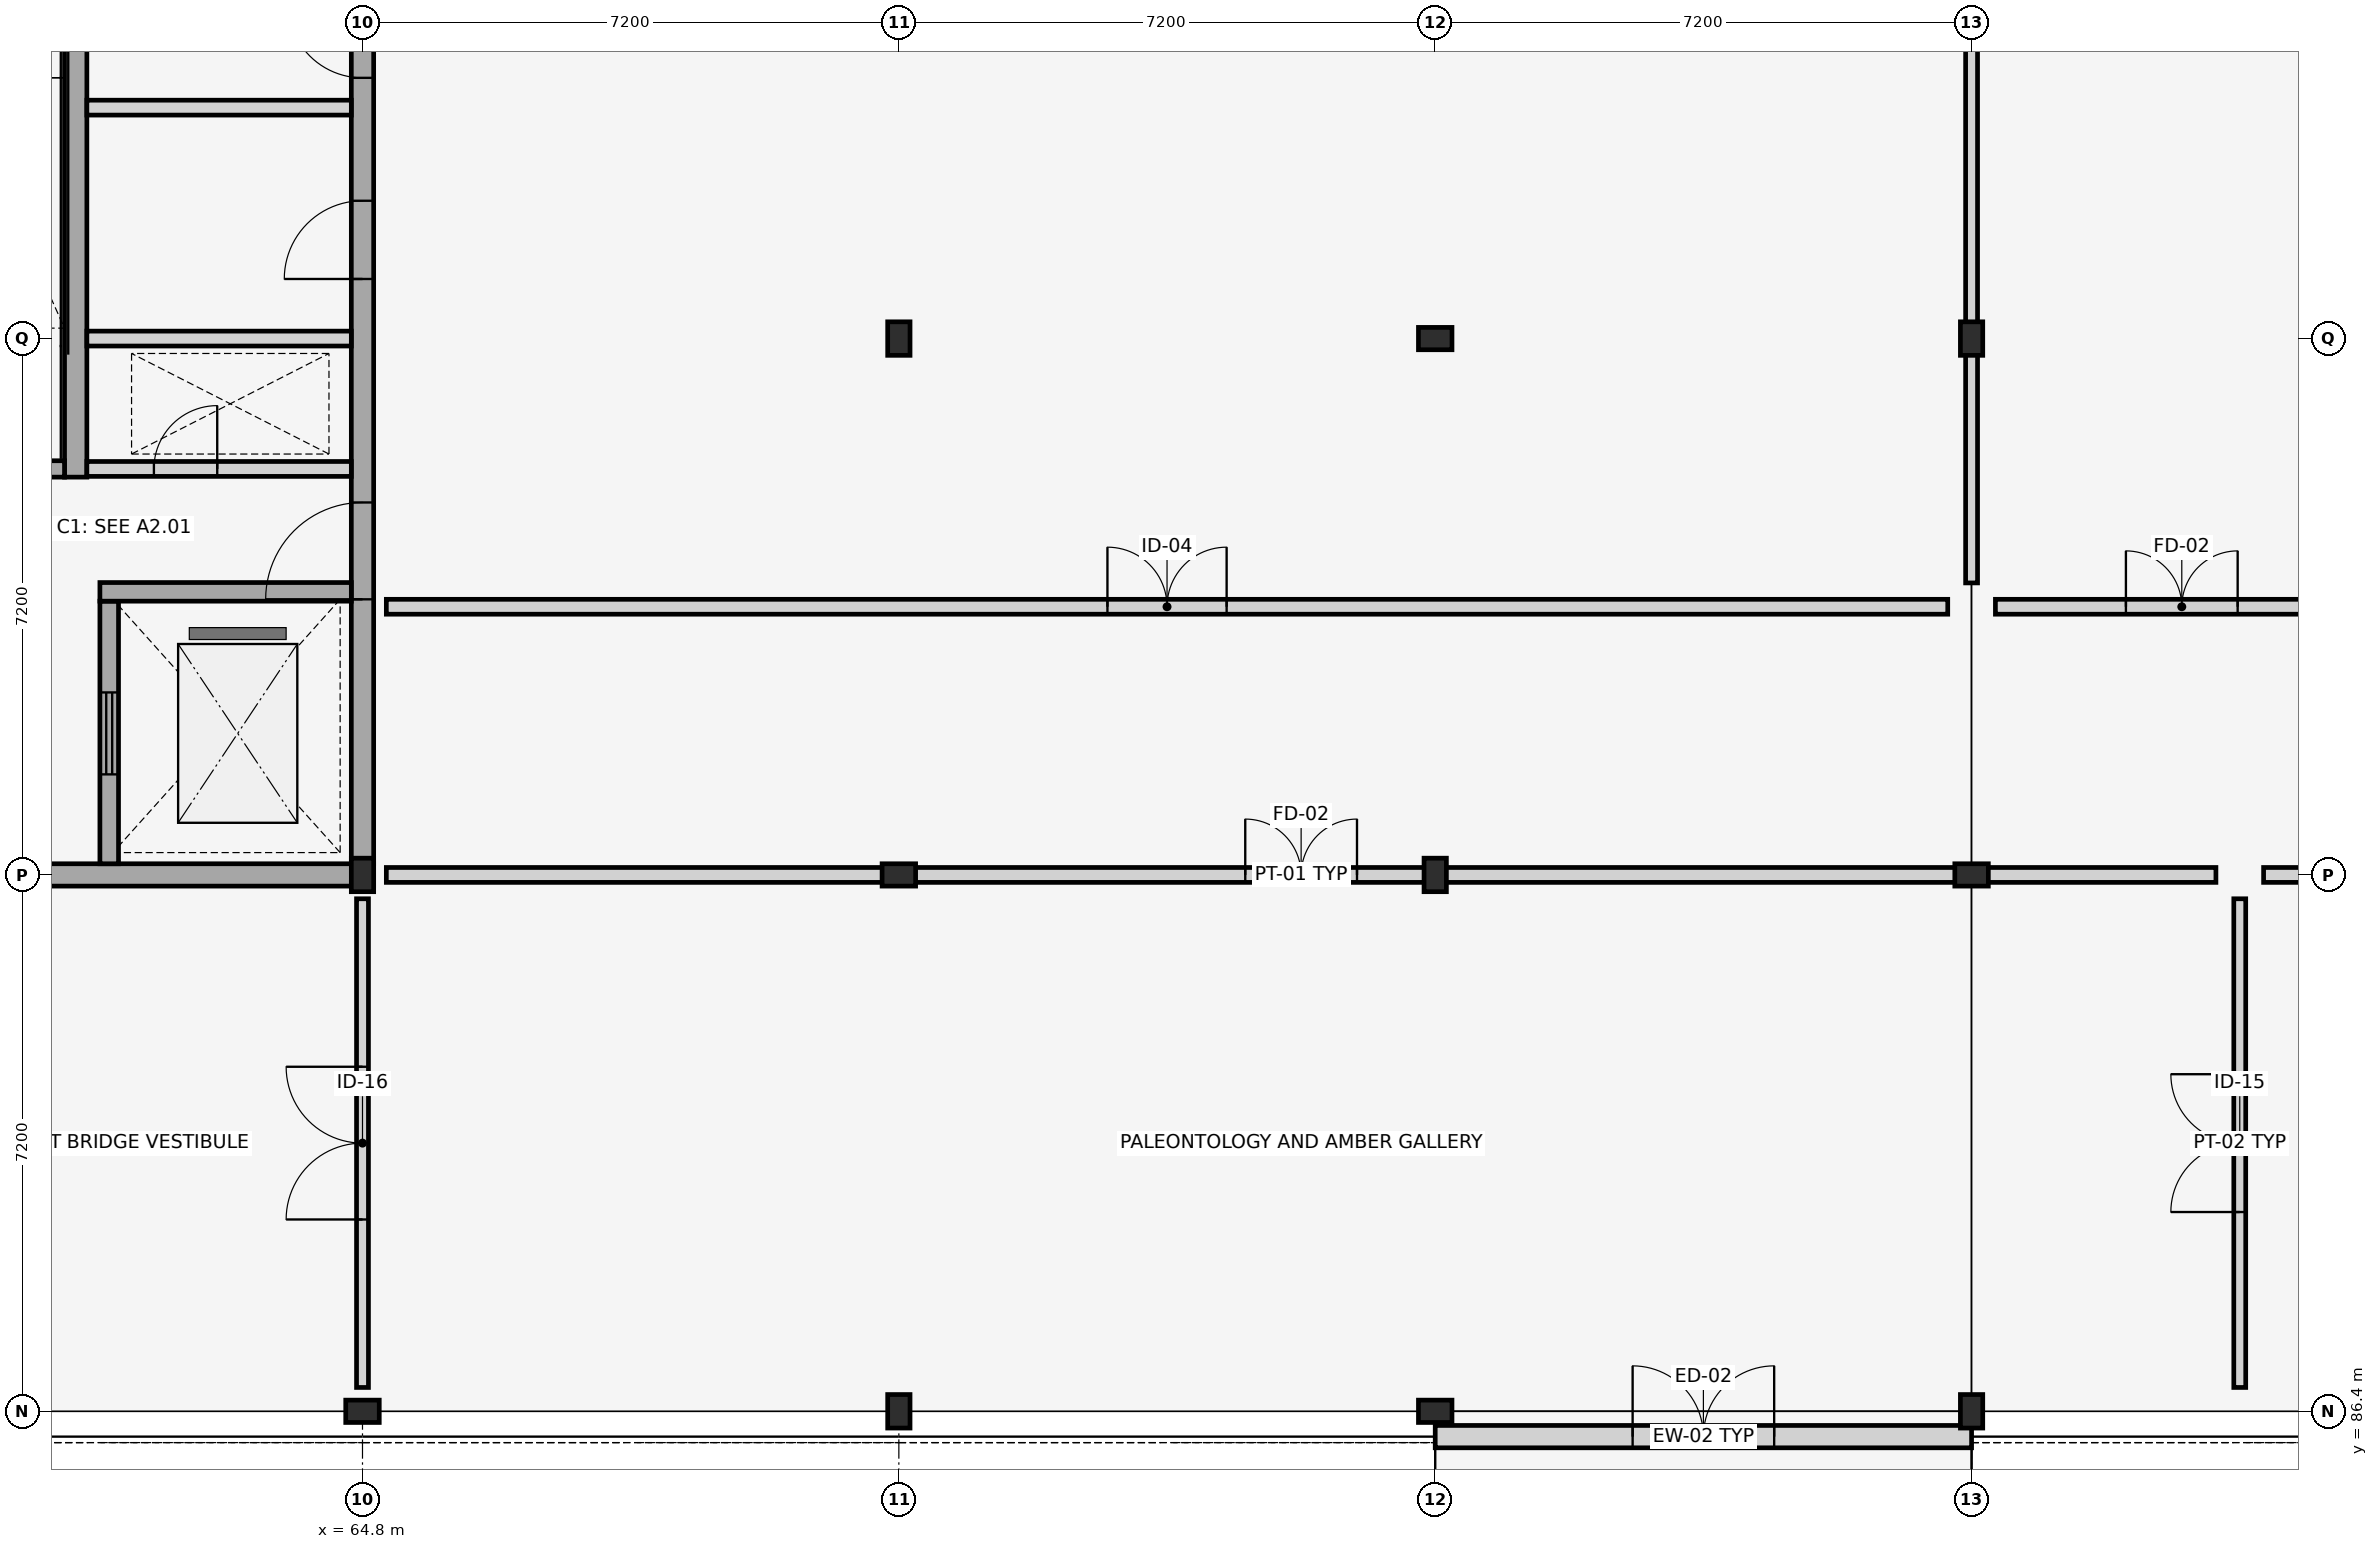
"""IFC4 building model, lengths in metres.
Left out: names, types, materials, properties, quantities, classifications, styles, units other than length and angle.
Written with IfcOpenShell. Run it as: python <this file> out.ifc"""

import sys

from ifc_helpers import new_model, si_unit, direction, frame, frame_2d, origin, origin_2d, place, context, subcontext, project, spatial, rectangle, i_section, extrude, element, fill, save


model = new_model("IFC4")
c1 = context("Model", 3, precision=1e-05, world=origin(), true_north=direction((0.0, 1.0)))
c2 = subcontext(c1, "Body", "Model", "MODEL_VIEW")
j1 = project(units=[si_unit("LENGTHUNIT", "METRE"), si_unit("PLANEANGLEUNIT", "RADIAN")], contexts=[c1])
p1 = place(None, origin())
s1 = spatial("IfcSite", under=j1, at=p1, CompositionType="ELEMENT")
p2 = place(p1, origin())
s2 = spatial("IfcBuilding", under=s1, at=p2, CompositionType="ELEMENT")
p3 = place(p2, frame((0.0, 0.0, 4.5)))
s3 = spatial("IfcBuildingStorey", under=s2, at=p3, CompositionType="ELEMENT", Elevation=4.5)
for number, where, z_axis, x_axis in (
    (1, (64.8, 86.4, 0.0), (0.0, 0.0, 1.0), (0.0, 1.0, 0.0)),
    (2, (64.8, 93.6, 0.0), (0.0, 0.0, 1.0), (1.0, 0.0, 0.0)),
    (3, (72.0, 86.4, 0.0), (0.0, 0.0, 1.0), (1.0, 0.0, 0.0)),
    (4, (72.0, 93.6, 0.0), (0.0, 0.0, 1.0), (0.0, 1.0, 0.0)),
    (5, (72.0, 100.8, 0.0), (0.0, 0.0, 1.0), (1.0, 0.0, 0.0)),
    (6, (79.2, 86.4, 0.0), (0.0, 0.0, 1.0), (0.0, 1.0, 0.0)),
    (7, (79.2, 93.6, 0.0), (0.0, 0.0, 1.0), (1.0, 0.0, 0.0)),
    (8, (79.2, 100.8, 0.0), (0.0, 0.0, 1.0), (0.0, 1.0, 0.0)),
    (9, (86.4, 86.4, 0.0), (0.0, 0.0, 1.0), (1.0, 0.0, 0.0)),
    (10, (86.4, 93.6, 0.0), (0.0, 0.0, 1.0), (0.0, 1.0, 0.0)),
    (11, (86.4, 100.8, 0.0), (0.0, 0.0, 1.0), (1.0, 0.0, 0.0)),
):
    element("IfcColumn", number, at=place(p3, frame(where, z_axis=z_axis, x_axis=x_axis)), inside=s3, PredefinedType="COLUMN", context=c2, shape_type="SweptSolid", body=[
        extrude(i_section(OverallWidth=0.3, OverallDepth=0.45, WebThickness=0.014, FlangeThickness=0.026, FilletRadius=0.027, at=origin_2d()), origin(), (0.0, 0.0, 1.0), 4.2),
    ])
p4 = place(p3, frame((79.2, 86.06, 0.0), z_axis=(0.0, 0.0, 1.0), x_axis=(1.0, 0.0, 0.0)))
e12 = element("IfcWall", 12, at=p4, inside=s3, PredefinedType="STANDARD", context=c2, shape_type="SweptSolid", body=[
    extrude(rectangle(XDim=7.2, YDim=0.3, at=frame_2d((3.6, 0.0))), origin(), (0.0, 0.0, 1.0), 3.65),
])
p5 = place(p4, frame((2.65, 0.0, 0.0)))
e13 = element("IfcOpeningElement", 13, at=p5, cuts=e12, PredefinedType="OPENING", context=c2, shape_type="SweptSolid", body=[
    extrude(rectangle(XDim=1.9, YDim=2.45, at=frame_2d((0.95, 1.225))), frame((0.0, 0.16, 0.0), z_axis=(0.0, -1.0, 0.0), x_axis=(1.0, 0.0, 0.0)), (0.0, 0.0, 1.0), 0.32),
])
p6 = place(p3, frame((57.6, 93.6, 0.0), z_axis=(0.0, 0.0, 1.0), x_axis=(1.0, 0.0, 0.0)))
e14 = element("IfcWall", 14, at=p6, inside=s3, PredefinedType="SHEAR", context=c2, shape_type="SweptSolid", body=[
    extrude(rectangle(XDim=7.35, YDim=0.3, at=frame_2d((3.675, 0.0))), origin(), (0.0, 0.0, 1.0), 3.98),
])
p7 = place(p3, frame((64.8, 93.75, 0.0), z_axis=(0.0, 0.0, 1.0), x_axis=(0.0, 1.0, 0.0)))
e15 = element("IfcWall", 15, at=p7, inside=s3, PredefinedType="SHEAR", context=c2, shape_type="SweptSolid", body=[
    extrude(rectangle(XDim=14.1, YDim=0.3, at=frame_2d((7.05, 0.0))), origin(), (0.0, 0.0, 1.0), 3.98),
])
p8 = place(p7, frame((3.55, 0.0, 0.0)))
e16 = element("IfcOpeningElement", 16, at=p8, cuts=e15, PredefinedType="OPENING", context=c2, shape_type="SweptSolid", body=[
    extrude(rectangle(XDim=1.3, YDim=2.2, at=frame_2d((0.65, 1.1))), frame((0.0, 0.16, 0.0), z_axis=(0.0, -1.0, 0.0), x_axis=(1.0, 0.0, 0.0)), (0.0, 0.0, 1.0), 0.32),
])
p9 = place(p7, frame((7.85, 0.0, 0.0)))
e17 = element("IfcOpeningElement", 17, at=p9, cuts=e15, PredefinedType="OPENING", context=c2, shape_type="SweptSolid", body=[
    extrude(rectangle(XDim=1.05, YDim=2.15, at=frame_2d((0.525, 1.075))), frame((0.0, 0.16, 0.0), z_axis=(0.0, -1.0, 0.0), x_axis=(1.0, 0.0, 0.0)), (0.0, 0.0, 1.0), 0.32),
])
p10 = place(p7, frame((10.55, 0.0, 0.0)))
e18 = element("IfcOpeningElement", 18, at=p10, cuts=e15, PredefinedType="OPENING", context=c2, shape_type="SweptSolid", body=[
    extrude(rectangle(XDim=1.0, YDim=2.15, at=frame_2d((0.5, 1.075))), frame((0.0, 0.16, 0.0), z_axis=(0.0, -1.0, 0.0), x_axis=(1.0, 0.0, 0.0)), (0.0, 0.0, 1.0), 0.32),
])
p11 = place(p3, frame((61.4, 93.75, 0.0), z_axis=(0.0, 0.0, 1.0), x_axis=(0.0, 1.0, 0.0)))
e19 = element("IfcWall", 19, at=p11, inside=s3, PredefinedType="SHEAR", context=c2, shape_type="SweptSolid", body=[
    extrude(rectangle(XDim=3.525, YDim=0.25, at=frame_2d((1.762, 0.0))), origin(), (0.0, 0.0, 1.0), 3.98),
])
p12 = place(p11, frame((1.2, 0.0, 0.0)))
e20 = element("IfcOpeningElement", 20, at=p12, cuts=e19, PredefinedType="OPENING", context=c2, shape_type="SweptSolid", body=[
    extrude(rectangle(XDim=1.1, YDim=2.15, at=frame_2d((0.55, 1.075))), frame((0.0, 0.135, 0.0), z_axis=(0.0, -1.0, 0.0), x_axis=(1.0, 0.0, 0.0)), (0.0, 0.0, 1.0), 0.27),
])
p13 = place(p3, frame((60.95, 98.94, 0.0), z_axis=(0.0, 0.0, 1.0), x_axis=(0.0, 1.0, 0.0)))
e21 = element("IfcWall", 21, at=p13, inside=s3, PredefinedType="SHEAR", context=c2, shape_type="SweptSolid", body=[
    extrude(rectangle(XDim=8.91, YDim=0.3, at=frame_2d((4.455, 0.0))), origin(), (0.0, 0.0, 1.0), 3.98),
])
p14 = place(p3, frame((61.1, 99.05, 0.0), z_axis=(0.0, 0.0, 1.0), x_axis=(1.0, 0.0, 0.0)))
e22 = element("IfcWall", 22, at=p14, inside=s3, PredefinedType="PLUMBINGWALL", context=c2, shape_type="SweptSolid", body=[
    extrude(rectangle(XDim=3.55, YDim=0.2, at=frame_2d((1.775, 0.0))), origin(), (0.0, 0.0, 1.0), 3.4),
])
p15 = place(p14, frame((0.9, 0.0, 0.0)))
e23 = element("IfcOpeningElement", 23, at=p15, cuts=e22, PredefinedType="OPENING", context=c2, shape_type="SweptSolid", body=[
    extrude(rectangle(XDim=0.85, YDim=2.05, at=frame_2d((0.425, 1.025))), frame((0.0, 0.11, 0.0), z_axis=(0.0, -1.0, 0.0), x_axis=(1.0, 0.0, 0.0)), (0.0, 0.0, 1.0), 0.22),
])
p16 = place(p3, frame((57.9, 99.05, 0.0), z_axis=(0.0, 0.0, 1.0), x_axis=(1.0, 0.0, 0.0)))
e24 = element("IfcWall", 24, at=p16, inside=s3, PredefinedType="SHEAR", context=c2, shape_type="SweptSolid", body=[
    extrude(rectangle(XDim=2.9, YDim=0.22, at=frame_2d((1.45, 0.0))), origin(), (0.0, 0.0, 1.0), 3.98),
])
p17 = place(p16, frame((0.75, 0.0, 0.0)))
e25 = element("IfcOpeningElement", 25, at=p17, cuts=e24, PredefinedType="OPENING", context=c2, shape_type="SweptSolid", body=[
    extrude(rectangle(XDim=1.3, YDim=2.2, at=frame_2d((0.65, 1.1))), frame((0.0, 0.12, 0.0), z_axis=(0.0, -1.0, 0.0), x_axis=(1.0, 0.0, 0.0)), (0.0, 0.0, 1.0), 0.24),
])
p18 = place(p3, frame((61.275, 97.4, 0.0), z_axis=(0.0, 0.0, 1.0), x_axis=(1.0, 0.0, 0.0)))
e26 = element("IfcWall", 26, at=p18, inside=s3, PredefinedType="SHEAR", context=c2, shape_type="SweptSolid", body=[
    extrude(rectangle(XDim=3.375, YDim=0.25, at=frame_2d((1.688, 0.0))), origin(), (0.0, 0.0, 1.0), 3.98),
])
for number, where, z_axis, x_axis in (
    (27, (61.1, 100.8, 0.0), (0.0, 0.0, 1.0), (1.0, 0.0, 0.0)),
    (28, (61.1, 103.9, 0.0), (0.0, 0.0, 1.0), (1.0, 0.0, 0.0)),
):
    element("IfcWall", number, at=place(p3, frame(where, z_axis=z_axis, x_axis=x_axis)), inside=s3, PredefinedType="PLUMBINGWALL", context=c2, shape_type="SweptSolid", body=[
        extrude(rectangle(XDim=3.55, YDim=0.2, at=frame_2d((1.775, 0.0))), origin(), (0.0, 0.0, 1.0), 3.4),
    ])
p19 = place(p3, frame((65.12, 93.6, 0.0), z_axis=(0.0, 0.0, 1.0), x_axis=(1.0, 0.0, 0.0)))
e29 = element("IfcWall", 29, at=p19, inside=s3, PredefinedType="PARTITIONING", context=c2, shape_type="SweptSolid", body=[
    extrude(rectangle(XDim=24.56, YDim=0.2, at=frame_2d((12.28, 0.0))), origin(), (0.0, 0.0, 1.0), 3.15),
])
p20 = place(p19, frame((11.53, 0.0, 0.0)))
e30 = element("IfcOpeningElement", 30, at=p20, cuts=e29, PredefinedType="OPENING", context=c2, shape_type="SweptSolid", body=[
    extrude(rectangle(XDim=1.5, YDim=2.25, at=frame_2d((0.75, 1.125))), frame((0.0, 0.11, 0.0), z_axis=(0.0, -1.0, 0.0), x_axis=(1.0, 0.0, 0.0)), (0.0, 0.0, 1.0), 0.22),
])
p21 = place(p3, frame((90.32, 93.6, 0.0), z_axis=(0.0, 0.0, 1.0), x_axis=(1.0, 0.0, 0.0)))
e31 = element("IfcWall", 31, at=p21, inside=s3, PredefinedType="PARTITIONING", context=c2, shape_type="SweptSolid", body=[
    extrude(rectangle(XDim=10.16, YDim=0.2, at=frame_2d((5.08, 0.0))), origin(), (0.0, 0.0, 1.0), 3.15),
])
p22 = place(p21, frame((4.28, 0.0, 0.0)))
e32 = element("IfcOpeningElement", 32, at=p22, cuts=e31, PredefinedType="OPENING", context=c2, shape_type="SweptSolid", body=[
    extrude(rectangle(XDim=1.6, YDim=2.35, at=frame_2d((0.8, 1.175))), frame((0.0, 0.11, 0.0), z_axis=(0.0, -1.0, 0.0), x_axis=(1.0, 0.0, 0.0)), (0.0, 0.0, 1.0), 0.22),
])
p23 = place(p3, frame((65.12, 97.2, 0.0), z_axis=(0.0, 0.0, 1.0), x_axis=(1.0, 0.0, 0.0)))
e33 = element("IfcWall", 33, at=p23, inside=s3, PredefinedType="PARTITIONING", context=c2, shape_type="SweptSolid", body=[
    extrude(rectangle(XDim=20.96, YDim=0.2, at=frame_2d((10.48, 0.0))), origin(), (0.0, 0.0, 1.0), 3.15),
])
p24 = place(p23, frame((9.68, 0.0, 0.0)))
e34 = element("IfcOpeningElement", 34, at=p24, cuts=e33, PredefinedType="OPENING", context=c2, shape_type="SweptSolid", body=[
    extrude(rectangle(XDim=1.6, YDim=2.35, at=frame_2d((0.8, 1.175))), frame((0.0, 0.11, 0.0), z_axis=(0.0, -1.0, 0.0), x_axis=(1.0, 0.0, 0.0)), (0.0, 0.0, 1.0), 0.22),
])
p25 = place(p3, frame((86.72, 97.2, 0.0), z_axis=(0.0, 0.0, 1.0), x_axis=(1.0, 0.0, 0.0)))
e35 = element("IfcWall", 35, at=p25, inside=s3, PredefinedType="PARTITIONING", context=c2, shape_type="SweptSolid", body=[
    extrude(rectangle(XDim=13.76, YDim=0.2, at=frame_2d((6.88, 0.0))), origin(), (0.0, 0.0, 1.0), 3.15),
])
p26 = place(p25, frame((1.752, 0.0, 0.0)))
e36 = element("IfcOpeningElement", 36, at=p26, cuts=e35, PredefinedType="OPENING", context=c2, shape_type="SweptSolid", body=[
    extrude(rectangle(XDim=1.5, YDim=2.25, at=frame_2d((0.75, 1.125))), frame((0.0, 0.11, 0.0), z_axis=(0.0, -1.0, 0.0), x_axis=(1.0, 0.0, 0.0)), (0.0, 0.0, 1.0), 0.22),
])
p27 = place(p3, frame((90.0, 86.72, 0.0), z_axis=(0.0, 0.0, 1.0), x_axis=(0.0, 1.0, 0.0)))
e37 = element("IfcWall", 37, at=p27, inside=s3, PredefinedType="PARTITIONING", context=c2, shape_type="SweptSolid", body=[
    extrude(rectangle(XDim=6.56, YDim=0.16, at=frame_2d((3.28, 0.0))), origin(), (0.0, 0.0, 1.0), 3.15),
])
p28 = place(p27, frame((2.355, 0.0, 0.0)))
e38 = element("IfcOpeningElement", 38, at=p28, cuts=e37, PredefinedType="OPENING", context=c2, shape_type="SweptSolid", body=[
    extrude(rectangle(XDim=1.85, YDim=2.5, at=frame_2d((0.925, 1.25))), frame((0.0, 0.09, 0.0), z_axis=(0.0, -1.0, 0.0), x_axis=(1.0, 0.0, 0.0)), (0.0, 0.0, 1.0), 0.18),
])
p29 = place(p3, frame((64.8, 86.72, 0.0), z_axis=(0.0, 0.0, 1.0), x_axis=(0.0, 1.0, 0.0)))
e39 = element("IfcWall", 39, at=p29, inside=s3, PredefinedType="PARTITIONING", context=c2, shape_type="SweptSolid", body=[
    extrude(rectangle(XDim=6.56, YDim=0.16, at=frame_2d((3.28, 0.0))), origin(), (0.0, 0.0, 1.0), 3.15),
])
p30 = place(p29, frame((2.255, 0.0, 0.0)))
e40 = element("IfcOpeningElement", 40, at=p30, cuts=e39, PredefinedType="OPENING", context=c2, shape_type="SweptSolid", body=[
    extrude(rectangle(XDim=2.05, YDim=2.55, at=frame_2d((1.025, 1.275))), frame((0.0, 0.09, 0.0), z_axis=(0.0, -1.0, 0.0), x_axis=(1.0, 0.0, 0.0)), (0.0, 0.0, 1.0), 0.18),
])
p31 = place(p3, frame((86.4, 97.52, 0.0), z_axis=(0.0, 0.0, 1.0), x_axis=(0.0, 1.0, 0.0)))
e41 = element("IfcWall", 41, at=p31, inside=s3, PredefinedType="PARTITIONING", context=c2, shape_type="SweptSolid", body=[
    extrude(rectangle(XDim=17.36, YDim=0.16, at=frame_2d((8.68, 0.0))), origin(), (0.0, 0.0, 1.0), 3.15),
])
p32 = place(p31, frame((8.23, 0.0, 0.0)))
e42 = element("IfcOpeningElement", 42, at=p32, cuts=e41, PredefinedType="OPENING", context=c2, shape_type="SweptSolid", body=[
    extrude(rectangle(XDim=0.9, YDim=2.1, at=frame_2d((0.45, 1.05))), frame((0.0, 0.09, 0.0), z_axis=(0.0, -1.0, 0.0), x_axis=(1.0, 0.0, 0.0)), (0.0, 0.0, 1.0), 0.18),
])
p33 = place(p5, origin())
e43 = element("IfcDoor", 43, at=p33, inside=s3, OperationType="DOUBLE_DOOR_SINGLE_SWING", PredefinedType="DOOR", context=c2, shape_type="SweptSolid", body=[
    extrude(rectangle(XDim=1.9, YDim=2.45, at=frame_2d((0.95, 1.225))), frame((0.0, 0.025, 0.0), z_axis=(0.0, -1.0, 0.0), x_axis=(1.0, 0.0, 0.0)), (0.0, 0.0, 1.0), 0.05),
])
fill(e13, e43)
p34 = place(p8, origin())
e44 = element("IfcDoor", 44, at=p34, inside=s3, OperationType="SINGLE_SWING_LEFT", PredefinedType="DOOR", context=c2, shape_type="SweptSolid", body=[
    extrude(rectangle(XDim=1.3, YDim=2.2, at=frame_2d((0.65, 1.1))), frame((0.0, 0.025, 0.0), z_axis=(0.0, -1.0, 0.0), x_axis=(1.0, 0.0, 0.0)), (0.0, 0.0, 1.0), 0.05),
])
fill(e16, e44)
p35 = place(p9, origin())
e45 = element("IfcDoor", 45, at=p35, inside=s3, OperationType="SINGLE_SWING_LEFT", PredefinedType="DOOR", context=c2, shape_type="SweptSolid", body=[
    extrude(rectangle(XDim=1.05, YDim=2.15, at=frame_2d((0.525, 1.075))), frame((0.0, 0.025, 0.0), z_axis=(0.0, -1.0, 0.0), x_axis=(1.0, 0.0, 0.0)), (0.0, 0.0, 1.0), 0.05),
])
fill(e17, e45)
p36 = place(p10, origin())
e46 = element("IfcDoor", 46, at=p36, inside=s3, OperationType="SINGLE_SWING_RIGHT", PredefinedType="DOOR", context=c2, shape_type="SweptSolid", body=[
    extrude(rectangle(XDim=1.0, YDim=2.15, at=frame_2d((0.5, 1.075))), frame((0.0, 0.025, 0.0), z_axis=(0.0, -1.0, 0.0), x_axis=(1.0, 0.0, 0.0)), (0.0, 0.0, 1.0), 0.05),
])
fill(e18, e46)
p37 = place(p12, origin())
e47 = element("IfcDoor", 47, at=p37, inside=s3, OperationType="SLIDING_TO_LEFT", PredefinedType="DOOR", context=c2, shape_type="SweptSolid", body=[
    extrude(rectangle(XDim=1.1, YDim=2.15, at=frame_2d((0.55, 1.075))), frame((0.0, 0.025, 0.0), z_axis=(0.0, -1.0, 0.0), x_axis=(1.0, 0.0, 0.0)), (0.0, 0.0, 1.0), 0.05),
])
fill(e20, e47)
p38 = place(p15, origin())
e48 = element("IfcDoor", 48, at=p38, inside=s3, OperationType="SINGLE_SWING_RIGHT", PredefinedType="TRAPDOOR", context=c2, shape_type="SweptSolid", body=[
    extrude(rectangle(XDim=0.85, YDim=2.05, at=frame_2d((0.425, 1.025))), frame((0.0, 0.025, 0.0), z_axis=(0.0, -1.0, 0.0), x_axis=(1.0, 0.0, 0.0)), (0.0, 0.0, 1.0), 0.05),
])
fill(e23, e48)
p39 = place(p20, origin())
e49 = element("IfcDoor", 49, at=p39, inside=s3, OperationType="DOUBLE_DOOR_SINGLE_SWING", PredefinedType="DOOR", context=c2, shape_type="SweptSolid", body=[
    extrude(rectangle(XDim=1.5, YDim=2.25, at=frame_2d((0.75, 1.125))), frame((0.0, 0.025, 0.0), z_axis=(0.0, -1.0, 0.0), x_axis=(1.0, 0.0, 0.0)), (0.0, 0.0, 1.0), 0.05),
])
fill(e30, e49)
p40 = place(p24, origin())
e50 = element("IfcDoor", 50, at=p40, inside=s3, OperationType="DOUBLE_DOOR_SINGLE_SWING", PredefinedType="DOOR", context=c2, shape_type="SweptSolid", body=[
    extrude(rectangle(XDim=1.6, YDim=2.35, at=frame_2d((0.8, 1.175))), frame((0.0, 0.025, 0.0), z_axis=(0.0, -1.0, 0.0), x_axis=(1.0, 0.0, 0.0)), (0.0, 0.0, 1.0), 0.05),
])
fill(e34, e50)
p41 = place(p26, origin())
e51 = element("IfcDoor", 51, at=p41, inside=s3, OperationType="DOUBLE_DOOR_SINGLE_SWING", PredefinedType="DOOR", context=c2, shape_type="SweptSolid", body=[
    extrude(rectangle(XDim=1.5, YDim=2.25, at=frame_2d((0.75, 1.125))), frame((0.0, 0.025, 0.0), z_axis=(0.0, -1.0, 0.0), x_axis=(1.0, 0.0, 0.0)), (0.0, 0.0, 1.0), 0.05),
])
fill(e36, e51)
p42 = place(p28, origin())
e52 = element("IfcDoor", 52, at=p42, inside=s3, OperationType="DOUBLE_DOOR_SINGLE_SWING", PredefinedType="DOOR", context=c2, shape_type="SweptSolid", body=[
    extrude(rectangle(XDim=1.85, YDim=2.5, at=frame_2d((0.925, 1.25))), frame((0.0, 0.025, 0.0), z_axis=(0.0, -1.0, 0.0), x_axis=(1.0, 0.0, 0.0)), (0.0, 0.0, 1.0), 0.05),
])
fill(e38, e52)
p43 = place(p30, origin())
e53 = element("IfcDoor", 53, at=p43, inside=s3, OperationType="DOUBLE_DOOR_SINGLE_SWING", PredefinedType="DOOR", context=c2, shape_type="SweptSolid", body=[
    extrude(rectangle(XDim=2.05, YDim=2.55, at=frame_2d((1.025, 1.275))), frame((0.0, 0.025, 0.0), z_axis=(0.0, -1.0, 0.0), x_axis=(1.0, 0.0, 0.0)), (0.0, 0.0, 1.0), 0.05),
])
fill(e40, e53)
save(model, sys.argv[1])
